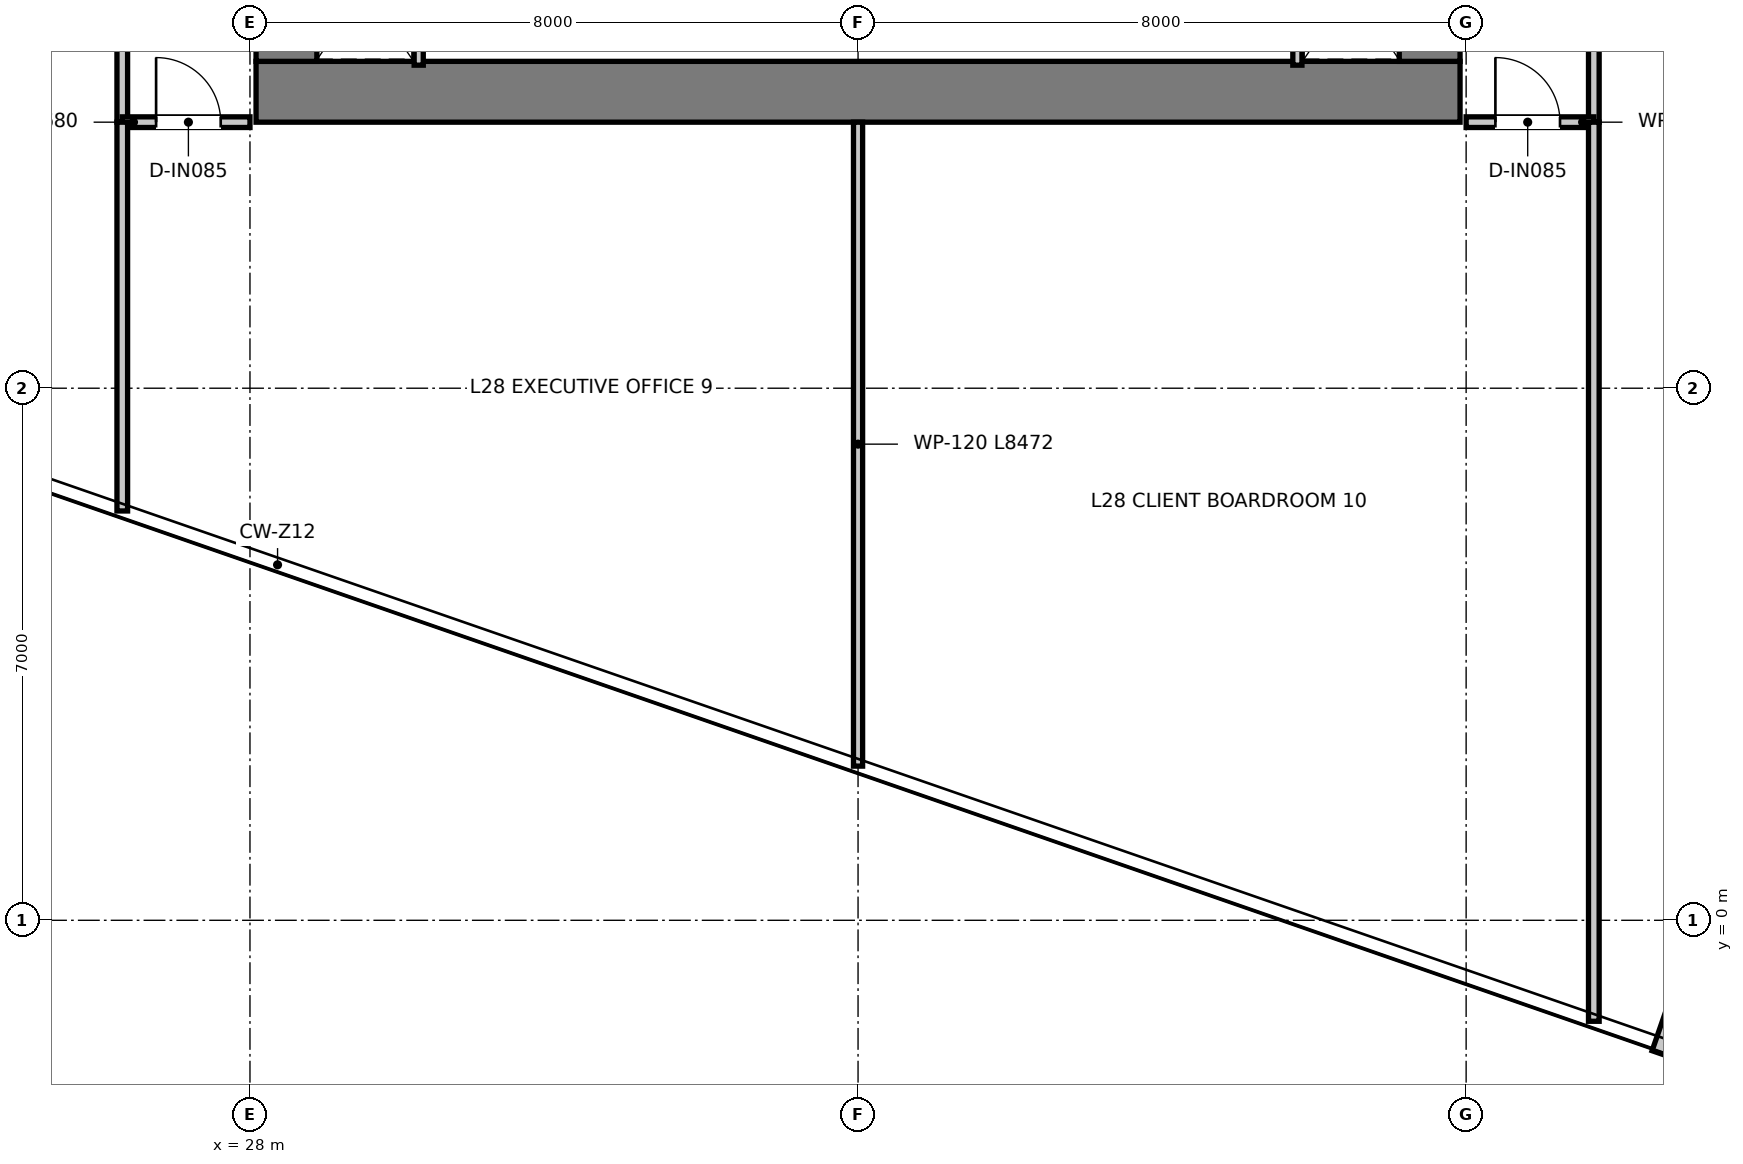
"""IFC4 building model, lengths in metres.
Left out: names, types, materials, properties, quantities, classifications, styles, units other than length and angle.
Written with IfcOpenShell. Run it as: python <this file> out.ifc"""

import sys

from ifc_helpers import new_model, si_unit, direction, frame, frame_2d, origin, place, context, subcontext, project, spatial, rectangle, extrude, element, fill, save


model = new_model("IFC4")
c1 = context("Model", 3, precision=1e-05, world=origin(), true_north=direction((0.0, 1.0)))
c2 = subcontext(c1, "Body", "Model", "MODEL_VIEW")
j1 = project(units=[si_unit("LENGTHUNIT", "METRE"), si_unit("PLANEANGLEUNIT", "RADIAN")], contexts=[c1])
p1 = place(None, origin())
s1 = spatial("IfcSite", under=j1, at=p1, CompositionType="ELEMENT")
p2 = place(p1, origin())
s2 = spatial("IfcBuilding", under=s1, at=p2, CompositionType="ELEMENT")
p3 = place(p2, frame((0.0, 0.0, 117.7)))
s3 = spatial("IfcBuildingStorey", under=s2, at=p3, CompositionType="ELEMENT", Elevation=117.7)
p4 = place(p3, frame((28.08, 10.9, 0.0), z_axis=(0.0, 0.0, 1.0), x_axis=(1.0, 0.0, 0.0)))
e1 = element("IfcWall", 1, at=p4, inside=s3, PredefinedType="SHEAR", context=c2, shape_type="SweptSolid", body=[
    extrude(rectangle(XDim=15.84, YDim=0.8, at=frame_2d((7.92, 0.0))), origin(), (0.0, 0.0, 1.0), 3.95),
])
for number, where, z_axis, x_axis in (
    (2, (28.48, 11.3, 0.0), (0.0, 0.0, 1.0), (0.0, 1.0, 0.0)),
    (3, (43.52, 11.3, 0.0), (0.0, 0.0, 1.0), (0.0, 1.0, 0.0)),
):
    element("IfcWall", number, at=place(p3, frame(where, z_axis=z_axis, x_axis=x_axis)), inside=s3, PredefinedType="SHEAR", context=c2, shape_type="SweptSolid", body=[
        extrude(rectangle(XDim=14.7, YDim=0.8, at=frame_2d((7.35, 0.0))), origin(), (0.0, 0.0, 1.0), 3.95),
    ])
p5 = place(p3, frame((46.551, -1.752, 0.0), z_axis=(0.0, 0.0, 1.0), x_axis=(0.327661647146, 0.944795133873, 0.0)))
e4 = element("IfcWall", 4, at=p5, inside=s3, PredefinedType="ELEMENTEDWALL", context=c2, shape_type="SweptSolid", body=[
    extrude(rectangle(XDim=4.245, YDim=0.22, at=frame_2d((2.123, 0.0))), origin(), (0.0, 0.0, 1.0), 3.67),
])
for number, where, z_axis, x_axis in (
    (5, (30.22, 11.25, 0.0), (0.0, 0.0, 1.0), (0.0, 1.0, 0.0)),
    (6, (41.78, 11.25, 0.0), (0.0, 0.0, 1.0), (0.0, 1.0, 0.0)),
):
    element("IfcWall", number, at=place(p3, frame(where, z_axis=z_axis, x_axis=x_axis)), inside=s3, PredefinedType="PARTITIONING", context=c2, shape_type="SweptSolid", body=[
        extrude(rectangle(XDim=1.97, YDim=0.12, at=frame_2d((0.985, 0.0))), origin(), (0.0, 0.0, 1.0), 3.67),
    ])
p6 = place(p3, frame((26.32, 10.5, 0.0), z_axis=(0.0, 0.0, 1.0), x_axis=(0.0, 1.0, 0.0)))
e7 = element("IfcWall", 7, at=p6, inside=s3, PredefinedType="PARTITIONING", context=c2, shape_type="SweptSolid", body=[
    extrude(rectangle(XDim=25.62, YDim=0.14, at=frame_2d((12.81, 0.0))), origin(), (0.0, 0.0, 1.0), 2.97),
])
p7 = place(p6, frame((15.125, 0.0, 0.0)))
e8 = element("IfcOpeningElement", 8, at=p7, cuts=e7, PredefinedType="OPENING", context=c2, shape_type="SweptSolid", body=[
    extrude(rectangle(XDim=0.95, YDim=2.1, at=frame_2d((0.475, 1.05))), frame((0.0, 0.08, 0.0), z_axis=(0.0, -1.0, 0.0), x_axis=(1.0, 0.0, 0.0)), (0.0, 0.0, 1.0), 0.16),
])
p8 = place(p3, frame((45.68, 10.5, 0.0), z_axis=(0.0, 0.0, 1.0), x_axis=(0.0, 1.0, 0.0)))
e9 = element("IfcWall", 9, at=p8, inside=s3, PredefinedType="PARTITIONING", context=c2, shape_type="SweptSolid", body=[
    extrude(rectangle(XDim=25.62, YDim=0.14, at=frame_2d((12.81, 0.0))), origin(), (0.0, 0.0, 1.0), 2.97),
])
p9 = place(p8, frame((9.525, 0.0, 0.0)))
e10 = element("IfcOpeningElement", 10, at=p9, cuts=e9, PredefinedType="OPENING", context=c2, shape_type="SweptSolid", body=[
    extrude(rectangle(XDim=0.95, YDim=2.1, at=frame_2d((0.475, 1.05))), frame((0.0, 0.08, 0.0), z_axis=(0.0, -1.0, 0.0), x_axis=(1.0, 0.0, 0.0)), (0.0, 0.0, 1.0), 0.16),
])
p10 = place(p8, frame((16.525, 0.0, 0.0)))
e11 = element("IfcOpeningElement", 11, at=p10, cuts=e9, PredefinedType="OPENING", context=c2, shape_type="SweptSolid", body=[
    extrude(rectangle(XDim=0.95, YDim=2.1, at=frame_2d((0.475, 1.05))), frame((0.0, 0.08, 0.0), z_axis=(0.0, -1.0, 0.0), x_axis=(1.0, 0.0, 0.0)), (0.0, 0.0, 1.0), 0.16),
])
p11 = place(p8, frame((22.125, 0.0, 0.0)))
e12 = element("IfcOpeningElement", 12, at=p11, cuts=e9, PredefinedType="OPENING", context=c2, shape_type="SweptSolid", body=[
    extrude(rectangle(XDim=0.95, YDim=2.1, at=frame_2d((0.475, 1.05))), frame((0.0, 0.08, 0.0), z_axis=(0.0, -1.0, 0.0), x_axis=(1.0, 0.0, 0.0)), (0.0, 0.0, 1.0), 0.16),
])
p12 = place(p3, frame((26.32, 10.5, 0.0), z_axis=(0.0, 0.0, 1.0), x_axis=(1.0, 0.0, 0.0)))
e13 = element("IfcWall", 13, at=p12, inside=s3, PredefinedType="PARTITIONING", context=c2, shape_type="SweptSolid", body=[
    extrude(rectangle(XDim=1.68, YDim=0.14, at=frame_2d((0.84, 0.0))), origin(), (0.0, 0.0, 1.0), 3.67),
])
p13 = place(p12, frame((0.445, 0.0, 0.0)))
e14 = element("IfcOpeningElement", 14, at=p13, cuts=e13, PredefinedType="OPENING", context=c2, shape_type="SweptSolid", body=[
    extrude(rectangle(XDim=0.85, YDim=2.1, at=frame_2d((0.425, 1.05))), frame((0.0, 0.08, 0.0), z_axis=(0.0, -1.0, 0.0), x_axis=(1.0, 0.0, 0.0)), (0.0, 0.0, 1.0), 0.16),
])
p14 = place(p3, frame((44.0, 10.5, 0.0), z_axis=(0.0, 0.0, 1.0), x_axis=(1.0, 0.0, 0.0)))
e15 = element("IfcWall", 15, at=p14, inside=s3, PredefinedType="PARTITIONING", context=c2, shape_type="SweptSolid", body=[
    extrude(rectangle(XDim=1.68, YDim=0.14, at=frame_2d((0.84, 0.0))), origin(), (0.0, 0.0, 1.0), 3.67),
])
p15 = place(p14, frame((0.385, 0.0, 0.0)))
e16 = element("IfcOpeningElement", 16, at=p15, cuts=e15, PredefinedType="OPENING", context=c2, shape_type="SweptSolid", body=[
    extrude(rectangle(XDim=0.85, YDim=2.1, at=frame_2d((0.425, 1.05))), frame((0.0, 0.08, 0.0), z_axis=(0.0, -1.0, 0.0), x_axis=(1.0, 0.0, 0.0)), (0.0, 0.0, 1.0), 0.16),
])
p16 = place(p3, frame((26.32, 5.385, 0.0), z_axis=(0.0, 0.0, 1.0), x_axis=(0.0, 1.0, 0.0)))
e17 = element("IfcWall", 17, at=p16, inside=s3, PredefinedType="PARTITIONING", context=c2, shape_type="SweptSolid", body=[
    extrude(rectangle(XDim=5.115, YDim=0.14, at=frame_2d((2.558, 0.0))), origin(), (0.0, 0.0, 1.0), 3.67),
])
p17 = place(p3, frame((45.68, -1.329, 0.0), z_axis=(0.0, 0.0, 1.0), x_axis=(0.0, 1.0, 0.0)))
e18 = element("IfcWall", 18, at=p17, inside=s3, PredefinedType="PARTITIONING", context=c2, shape_type="SweptSolid", body=[
    extrude(rectangle(XDim=11.829, YDim=0.14, at=frame_2d((5.914, 0.0))), origin(), (0.0, 0.0, 1.0), 3.67),
])
p18 = place(p3, frame((36.0, 2.028, 0.0), z_axis=(0.0, 0.0, 1.0), x_axis=(0.0, 1.0, 0.0)))
e19 = element("IfcWall", 19, at=p18, inside=s3, PredefinedType="PARTITIONING", context=c2, shape_type="SweptSolid", body=[
    extrude(rectangle(XDim=8.472, YDim=0.12, at=frame_2d((4.236, 0.0))), origin(), (0.0, 0.0, 1.0), 3.67),
])
p19 = place(p13, origin())
e20 = element("IfcDoor", 20, at=p19, inside=s3, OperationType="SINGLE_SWING_LEFT", PredefinedType="DOOR", context=c2, shape_type="SweptSolid", body=[
    extrude(rectangle(XDim=0.85, YDim=2.1, at=frame_2d((0.425, 1.05))), frame((0.0, 0.025, 0.0), z_axis=(0.0, -1.0, 0.0), x_axis=(1.0, 0.0, 0.0)), (0.0, 0.0, 1.0), 0.05),
])
fill(e14, e20)
p20 = place(p15, origin())
e21 = element("IfcDoor", 21, at=p20, inside=s3, OperationType="SINGLE_SWING_LEFT", PredefinedType="DOOR", context=c2, shape_type="SweptSolid", body=[
    extrude(rectangle(XDim=0.85, YDim=2.1, at=frame_2d((0.425, 1.05))), frame((0.0, 0.025, 0.0), z_axis=(0.0, -1.0, 0.0), x_axis=(1.0, 0.0, 0.0)), (0.0, 0.0, 1.0), 0.05),
])
fill(e16, e21)
save(model, sys.argv[1])
